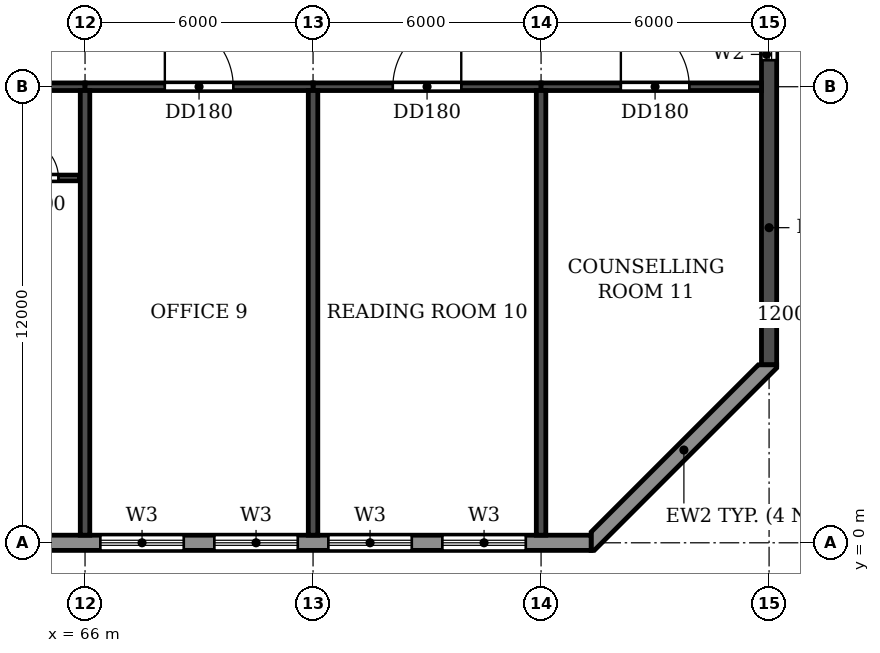
"""IFC4 building model, lengths in metres.
Left out: names, types, materials, properties, quantities, classifications, styles, units other than length and angle.
Written with IfcOpenShell. Run it as: python <this file> out.ifc"""

import sys

from ifc_helpers import new_model, si_unit, direction, frame, frame_2d, origin, place, context, subcontext, project, spatial, polyline, rectangle, outline, extrude, element, fill, save


model = new_model("IFC4")
c1 = context("Model", 3, precision=1e-05, world=origin(), true_north=direction((0.0, 1.0)))
c2 = subcontext(c1, "Body", "Model", "MODEL_VIEW")
j1 = project(units=[si_unit("LENGTHUNIT", "METRE"), si_unit("PLANEANGLEUNIT", "RADIAN")], contexts=[c1])
p1 = place(None, origin())
s1 = spatial("IfcSite", under=j1, at=p1, CompositionType="ELEMENT")
p2 = place(p1, origin())
s2 = spatial("IfcBuilding", under=s1, at=p2, CompositionType="ELEMENT")
p3 = place(p2, frame((0.0, 0.0, 211.5)))
s3 = spatial("IfcBuildingStorey", under=s2, at=p3, CompositionType="ELEMENT", Elevation=211.5)
for number, where, z_axis, x_axis in (
    (1, (66.0, 0.2, 0.0), (0.0, 0.0, 1.0), (0.0, 1.0, 0.0)),
    (2, (72.0, 0.2, 0.0), (0.0, 0.0, 1.0), (0.0, 1.0, 0.0)),
    (3, (78.0, 0.2, 0.0), (0.0, 0.0, 1.0), (0.0, 1.0, 0.0)),
):
    element("IfcWall", number, at=place(p3, frame(where, z_axis=z_axis, x_axis=x_axis)), inside=s3, PredefinedType="SHEAR", context=c2, shape_type="SweptSolid", body=[
        extrude(rectangle(XDim=11.7, YDim=0.25, at=frame_2d((5.85, 0.0))), origin(), (0.0, 0.0, 1.0), 2.95),
    ])
p4 = place(p3, frame((84.0, 4.683, 0.0), z_axis=(0.0, 0.0, 1.0), x_axis=(0.0, 1.0, 0.0)))
e4 = element("IfcWall", 4, at=p4, inside=s3, PredefinedType="SHEAR", context=c2, shape_type="SweptSolid", body=[
    extrude(rectangle(XDim=31.834, YDim=0.4, at=frame_2d((15.917, 0.0))), origin(), (0.0, 0.0, 1.0), 2.95),
])
p5 = place(p4, frame((23.817, 0.0, 0.9)))
e5 = element("IfcOpeningElement", 5, at=p5, cuts=e4, PredefinedType="OPENING", context=c2, shape_type="SweptSolid", body=[
    extrude(rectangle(XDim=1.2, YDim=1.5, at=frame_2d((0.6, 0.75))), frame((0.0, 0.21, 0.0), z_axis=(0.0, -1.0, 0.0), x_axis=(1.0, 0.0, 0.0)), (0.0, 0.0, 1.0), 0.42),
])
p6 = place(p4, frame((8.017, 0.0, 0.9)))
e6 = element("IfcOpeningElement", 6, at=p6, cuts=e4, PredefinedType="OPENING", context=c2, shape_type="SweptSolid", body=[
    extrude(rectangle(XDim=1.2, YDim=1.5, at=frame_2d((0.6, 0.75))), frame((0.0, 0.21, 0.0), z_axis=(0.0, -1.0, 0.0), x_axis=(1.0, 0.0, 0.0)), (0.0, 0.0, 1.0), 0.42),
])
p7 = place(p4, frame((27.694, 0.0, 0.6)))
e7 = element("IfcOpeningElement", 7, at=p7, cuts=e4, PredefinedType="OPENING", context=c2, shape_type="SweptSolid", body=[
    extrude(rectangle(XDim=2.2, YDim=1.8, at=frame_2d((1.1, 0.9))), frame((0.0, 0.21, 0.0), z_axis=(0.0, -1.0, 0.0), x_axis=(1.0, 0.0, 0.0)), (0.0, 0.0, 1.0), 0.42),
])
p8 = place(p4, frame((15.917, 0.0, 0.9)))
e8 = element("IfcOpeningElement", 8, at=p8, cuts=e4, PredefinedType="OPENING", context=c2, shape_type="SweptSolid", body=[
    extrude(rectangle(XDim=1.2, YDim=1.5, at=frame_2d((0.6, 0.75))), frame((0.0, 0.21, 0.0), z_axis=(0.0, -1.0, 0.0), x_axis=(1.0, 0.0, 0.0)), (0.0, 0.0, 1.0), 0.42),
])
p9 = place(p3, frame((60.0, 12.0, 0.0), z_axis=(0.0, 0.0, 1.0), x_axis=(1.0, 0.0, 0.0)))
e9 = element("IfcWall", 9, at=p9, inside=s3, PredefinedType="SHEAR", context=c2, shape_type="SweptSolid", body=[
    extrude(rectangle(XDim=6.0, YDim=0.2, at=frame_2d((3.0, 0.0))), origin(), (0.0, 0.0, 1.0), 2.35),
])
p10 = place(p9, frame((2.55, 0.0, 0.0)))
e10 = element("IfcOpeningElement", 10, at=p10, cuts=e9, PredefinedType="OPENING", context=c2, shape_type="SweptSolid", body=[
    extrude(rectangle(XDim=0.9, YDim=2.1, at=frame_2d((0.45, 1.05))), frame((0.0, 0.11, 0.0), z_axis=(0.0, -1.0, 0.0), x_axis=(1.0, 0.0, 0.0)), (0.0, 0.0, 1.0), 0.22),
])
p11 = place(p3, frame((66.0, 12.0, 0.0), z_axis=(0.0, 0.0, 1.0), x_axis=(1.0, 0.0, 0.0)))
e11 = element("IfcWall", 11, at=p11, inside=s3, PredefinedType="SHEAR", context=c2, shape_type="SweptSolid", body=[
    extrude(rectangle(XDim=6.0, YDim=0.2, at=frame_2d((3.0, 0.0))), origin(), (0.0, 0.0, 1.0), 2.35),
])
p12 = place(p11, frame((2.1, 0.0, 0.0)))
e12 = element("IfcOpeningElement", 12, at=p12, cuts=e11, PredefinedType="OPENING", context=c2, shape_type="SweptSolid", body=[
    extrude(rectangle(XDim=1.8, YDim=2.1, at=frame_2d((0.9, 1.05))), frame((0.0, 0.11, 0.0), z_axis=(0.0, -1.0, 0.0), x_axis=(1.0, 0.0, 0.0)), (0.0, 0.0, 1.0), 0.22),
])
p13 = place(p3, frame((72.0, 12.0, 0.0), z_axis=(0.0, 0.0, 1.0), x_axis=(1.0, 0.0, 0.0)))
e13 = element("IfcWall", 13, at=p13, inside=s3, PredefinedType="SHEAR", context=c2, shape_type="SweptSolid", body=[
    extrude(rectangle(XDim=6.0, YDim=0.2, at=frame_2d((3.0, 0.0))), origin(), (0.0, 0.0, 1.0), 2.35),
])
p14 = place(p13, frame((2.1, 0.0, 0.0)))
e14 = element("IfcOpeningElement", 14, at=p14, cuts=e13, PredefinedType="OPENING", context=c2, shape_type="SweptSolid", body=[
    extrude(rectangle(XDim=1.8, YDim=2.1, at=frame_2d((0.9, 1.05))), frame((0.0, 0.11, 0.0), z_axis=(0.0, -1.0, 0.0), x_axis=(1.0, 0.0, 0.0)), (0.0, 0.0, 1.0), 0.22),
])
p15 = place(p3, frame((78.0, 12.0, 0.0), z_axis=(0.0, 0.0, 1.0), x_axis=(1.0, 0.0, 0.0)))
e15 = element("IfcWall", 15, at=p15, inside=s3, PredefinedType="SHEAR", context=c2, shape_type="SweptSolid", body=[
    extrude(rectangle(XDim=5.8, YDim=0.2, at=frame_2d((2.9, 0.0))), origin(), (0.0, 0.0, 1.0), 2.35),
])
p16 = place(p15, frame((2.1, 0.0, 0.0)))
e16 = element("IfcOpeningElement", 16, at=p16, cuts=e15, PredefinedType="OPENING", context=c2, shape_type="SweptSolid", body=[
    extrude(rectangle(XDim=1.8, YDim=2.1, at=frame_2d((0.9, 1.05))), frame((0.0, 0.11, 0.0), z_axis=(0.0, -1.0, 0.0), x_axis=(1.0, 0.0, 0.0)), (0.0, 0.0, 1.0), 0.22),
])
p17 = place(p3, frame((22.683, 0.0, 0.0), z_axis=(0.0, 0.0, 1.0), x_axis=(1.0, 0.0, 0.0)))
e17 = element("IfcWall", 17, at=p17, inside=s3, PredefinedType="STANDARD", context=c2, shape_type="SweptSolid", body=[
    extrude(rectangle(XDim=56.634, YDim=0.4, at=frame_2d((28.317, 0.0))), origin(), (0.0, 0.0, 1.0), 2.95),
])
p18 = place(p17, frame((1.717, 0.0, 0.6)))
e18 = element("IfcOpeningElement", 18, at=p18, cuts=e17, PredefinedType="OPENING", context=c2, shape_type="SweptSolid", body=[
    extrude(rectangle(XDim=2.2, YDim=1.8, at=frame_2d((1.1, 0.9))), frame((0.0, 0.21, 0.0), z_axis=(0.0, -1.0, 0.0), x_axis=(1.0, 0.0, 0.0)), (0.0, 0.0, 1.0), 0.42),
])
p19 = place(p17, frame((4.717, 0.0, 0.6)))
e19 = element("IfcOpeningElement", 19, at=p19, cuts=e17, PredefinedType="OPENING", context=c2, shape_type="SweptSolid", body=[
    extrude(rectangle(XDim=2.2, YDim=1.8, at=frame_2d((1.1, 0.9))), frame((0.0, 0.21, 0.0), z_axis=(0.0, -1.0, 0.0), x_axis=(1.0, 0.0, 0.0)), (0.0, 0.0, 1.0), 0.42),
])
p20 = place(p17, frame((7.717, 0.0, 0.6)))
e20 = element("IfcOpeningElement", 20, at=p20, cuts=e17, PredefinedType="OPENING", context=c2, shape_type="SweptSolid", body=[
    extrude(rectangle(XDim=2.2, YDim=1.8, at=frame_2d((1.1, 0.9))), frame((0.0, 0.21, 0.0), z_axis=(0.0, -1.0, 0.0), x_axis=(1.0, 0.0, 0.0)), (0.0, 0.0, 1.0), 0.42),
])
p21 = place(p17, frame((10.717, 0.0, 0.6)))
e21 = element("IfcOpeningElement", 21, at=p21, cuts=e17, PredefinedType="OPENING", context=c2, shape_type="SweptSolid", body=[
    extrude(rectangle(XDim=2.2, YDim=1.8, at=frame_2d((1.1, 0.9))), frame((0.0, 0.21, 0.0), z_axis=(0.0, -1.0, 0.0), x_axis=(1.0, 0.0, 0.0)), (0.0, 0.0, 1.0), 0.42),
])
p22 = place(p17, frame((13.717, 0.0, 0.6)))
e22 = element("IfcOpeningElement", 22, at=p22, cuts=e17, PredefinedType="OPENING", context=c2, shape_type="SweptSolid", body=[
    extrude(rectangle(XDim=2.2, YDim=1.8, at=frame_2d((1.1, 0.9))), frame((0.0, 0.21, 0.0), z_axis=(0.0, -1.0, 0.0), x_axis=(1.0, 0.0, 0.0)), (0.0, 0.0, 1.0), 0.42),
])
p23 = place(p17, frame((16.717, 0.0, 0.6)))
e23 = element("IfcOpeningElement", 23, at=p23, cuts=e17, PredefinedType="OPENING", context=c2, shape_type="SweptSolid", body=[
    extrude(rectangle(XDim=2.2, YDim=1.8, at=frame_2d((1.1, 0.9))), frame((0.0, 0.21, 0.0), z_axis=(0.0, -1.0, 0.0), x_axis=(1.0, 0.0, 0.0)), (0.0, 0.0, 1.0), 0.42),
])
p24 = place(p17, frame((19.717, 0.0, 0.6)))
e24 = element("IfcOpeningElement", 24, at=p24, cuts=e17, PredefinedType="OPENING", context=c2, shape_type="SweptSolid", body=[
    extrude(rectangle(XDim=2.2, YDim=1.8, at=frame_2d((1.1, 0.9))), frame((0.0, 0.21, 0.0), z_axis=(0.0, -1.0, 0.0), x_axis=(1.0, 0.0, 0.0)), (0.0, 0.0, 1.0), 0.42),
])
p25 = place(p17, frame((22.717, 0.0, 0.6)))
e25 = element("IfcOpeningElement", 25, at=p25, cuts=e17, PredefinedType="OPENING", context=c2, shape_type="SweptSolid", body=[
    extrude(rectangle(XDim=2.2, YDim=1.8, at=frame_2d((1.1, 0.9))), frame((0.0, 0.21, 0.0), z_axis=(0.0, -1.0, 0.0), x_axis=(1.0, 0.0, 0.0)), (0.0, 0.0, 1.0), 0.42),
])
p26 = place(p17, frame((25.717, 0.0, 0.6)))
e26 = element("IfcOpeningElement", 26, at=p26, cuts=e17, PredefinedType="OPENING", context=c2, shape_type="SweptSolid", body=[
    extrude(rectangle(XDim=2.2, YDim=1.8, at=frame_2d((1.1, 0.9))), frame((0.0, 0.21, 0.0), z_axis=(0.0, -1.0, 0.0), x_axis=(1.0, 0.0, 0.0)), (0.0, 0.0, 1.0), 0.42),
])
p27 = place(p17, frame((28.717, 0.0, 0.6)))
e27 = element("IfcOpeningElement", 27, at=p27, cuts=e17, PredefinedType="OPENING", context=c2, shape_type="SweptSolid", body=[
    extrude(rectangle(XDim=2.2, YDim=1.8, at=frame_2d((1.1, 0.9))), frame((0.0, 0.21, 0.0), z_axis=(0.0, -1.0, 0.0), x_axis=(1.0, 0.0, 0.0)), (0.0, 0.0, 1.0), 0.42),
])
p28 = place(p17, frame((31.717, 0.0, 0.6)))
e28 = element("IfcOpeningElement", 28, at=p28, cuts=e17, PredefinedType="OPENING", context=c2, shape_type="SweptSolid", body=[
    extrude(rectangle(XDim=2.2, YDim=1.8, at=frame_2d((1.1, 0.9))), frame((0.0, 0.21, 0.0), z_axis=(0.0, -1.0, 0.0), x_axis=(1.0, 0.0, 0.0)), (0.0, 0.0, 1.0), 0.42),
])
p29 = place(p17, frame((34.717, 0.0, 0.6)))
e29 = element("IfcOpeningElement", 29, at=p29, cuts=e17, PredefinedType="OPENING", context=c2, shape_type="SweptSolid", body=[
    extrude(rectangle(XDim=2.2, YDim=1.8, at=frame_2d((1.1, 0.9))), frame((0.0, 0.21, 0.0), z_axis=(0.0, -1.0, 0.0), x_axis=(1.0, 0.0, 0.0)), (0.0, 0.0, 1.0), 0.42),
])
p30 = place(p17, frame((43.717, 0.0, 0.6)))
e30 = element("IfcOpeningElement", 30, at=p30, cuts=e17, PredefinedType="OPENING", context=c2, shape_type="SweptSolid", body=[
    extrude(rectangle(XDim=2.2, YDim=1.8, at=frame_2d((1.1, 0.9))), frame((0.0, 0.21, 0.0), z_axis=(0.0, -1.0, 0.0), x_axis=(1.0, 0.0, 0.0)), (0.0, 0.0, 1.0), 0.42),
])
p31 = place(p17, frame((46.717, 0.0, 0.6)))
e31 = element("IfcOpeningElement", 31, at=p31, cuts=e17, PredefinedType="OPENING", context=c2, shape_type="SweptSolid", body=[
    extrude(rectangle(XDim=2.2, YDim=1.8, at=frame_2d((1.1, 0.9))), frame((0.0, 0.21, 0.0), z_axis=(0.0, -1.0, 0.0), x_axis=(1.0, 0.0, 0.0)), (0.0, 0.0, 1.0), 0.42),
])
p32 = place(p17, frame((49.717, 0.0, 0.6)))
e32 = element("IfcOpeningElement", 32, at=p32, cuts=e17, PredefinedType="OPENING", context=c2, shape_type="SweptSolid", body=[
    extrude(rectangle(XDim=2.2, YDim=1.8, at=frame_2d((1.1, 0.9))), frame((0.0, 0.21, 0.0), z_axis=(0.0, -1.0, 0.0), x_axis=(1.0, 0.0, 0.0)), (0.0, 0.0, 1.0), 0.42),
])
p33 = place(p17, frame((52.717, 0.0, 0.6)))
e33 = element("IfcOpeningElement", 33, at=p33, cuts=e17, PredefinedType="OPENING", context=c2, shape_type="SweptSolid", body=[
    extrude(rectangle(XDim=2.2, YDim=1.8, at=frame_2d((1.1, 0.9))), frame((0.0, 0.21, 0.0), z_axis=(0.0, -1.0, 0.0), x_axis=(1.0, 0.0, 0.0)), (0.0, 0.0, 1.0), 0.42),
])
p34 = place(p3, origin())
e34 = element("IfcWall", 34, at=p34, inside=s3, PredefinedType="STANDARD", context=c2, shape_type="SweptSolid", body=[
    extrude(outline(polyline([(79.317, -0.2), (79.4, -0.2), (84.2, 4.6), (84.2, 4.683), (83.717, 4.683), (79.317, 0.283), (79.317, -0.2)])), origin(), (0.0, 0.0, 1.0), 2.95),
])
p35 = place(p3, frame((60.135, 9.6, 0.0), z_axis=(0.0, 0.0, 1.0), x_axis=(1.0, 0.0, 0.0)))
e35 = element("IfcWall", 35, at=p35, inside=s3, PredefinedType="PARTITIONING", context=c2, shape_type="SweptSolid", body=[
    extrude(rectangle(XDim=5.73, YDim=0.15, at=frame_2d((2.865, 0.0))), origin(), (0.0, 0.0, 1.0), 2.95),
])
p36 = place(p35, frame((1.165, 0.0, 0.0)))
e36 = element("IfcOpeningElement", 36, at=p36, cuts=e35, PredefinedType="OPENING", context=c2, shape_type="SweptSolid", body=[
    extrude(rectangle(XDim=1.0, YDim=2.1, at=frame_2d((0.5, 1.05))), frame((0.0, 0.085, 0.0), z_axis=(0.0, -1.0, 0.0), x_axis=(1.0, 0.0, 0.0)), (0.0, 0.0, 1.0), 0.17),
])
p37 = place(p35, frame((4.165, 0.0, 0.0)))
e37 = element("IfcOpeningElement", 37, at=p37, cuts=e35, PredefinedType="OPENING", context=c2, shape_type="SweptSolid", body=[
    extrude(rectangle(XDim=1.0, YDim=2.1, at=frame_2d((0.5, 1.05))), frame((0.0, 0.085, 0.0), z_axis=(0.0, -1.0, 0.0), x_axis=(1.0, 0.0, 0.0)), (0.0, 0.0, 1.0), 0.17),
])
p38 = place(p30, origin())
e38 = element("IfcWindow", 38, at=p38, inside=s3, PartitioningType="DOUBLE_PANEL_HORIZONTAL", PredefinedType="WINDOW", context=c2, shape_type="SweptSolid", body=[
    extrude(rectangle(XDim=2.2, YDim=1.8, at=frame_2d((1.1, 0.9))), frame((0.0, 0.03, 0.0), z_axis=(0.0, -1.0, 0.0), x_axis=(1.0, 0.0, 0.0)), (0.0, 0.0, 1.0), 0.06),
])
fill(e30, e38)
p39 = place(p31, origin())
e39 = element("IfcWindow", 39, at=p39, inside=s3, PartitioningType="DOUBLE_PANEL_HORIZONTAL", PredefinedType="WINDOW", context=c2, shape_type="SweptSolid", body=[
    extrude(rectangle(XDim=2.2, YDim=1.8, at=frame_2d((1.1, 0.9))), frame((0.0, 0.03, 0.0), z_axis=(0.0, -1.0, 0.0), x_axis=(1.0, 0.0, 0.0)), (0.0, 0.0, 1.0), 0.06),
])
fill(e31, e39)
p40 = place(p32, origin())
e40 = element("IfcWindow", 40, at=p40, inside=s3, PartitioningType="DOUBLE_PANEL_HORIZONTAL", PredefinedType="WINDOW", context=c2, shape_type="SweptSolid", body=[
    extrude(rectangle(XDim=2.2, YDim=1.8, at=frame_2d((1.1, 0.9))), frame((0.0, 0.03, 0.0), z_axis=(0.0, -1.0, 0.0), x_axis=(1.0, 0.0, 0.0)), (0.0, 0.0, 1.0), 0.06),
])
fill(e32, e40)
p41 = place(p33, origin())
e41 = element("IfcWindow", 41, at=p41, inside=s3, PartitioningType="DOUBLE_PANEL_HORIZONTAL", PredefinedType="WINDOW", context=c2, shape_type="SweptSolid", body=[
    extrude(rectangle(XDim=2.2, YDim=1.8, at=frame_2d((1.1, 0.9))), frame((0.0, 0.03, 0.0), z_axis=(0.0, -1.0, 0.0), x_axis=(1.0, 0.0, 0.0)), (0.0, 0.0, 1.0), 0.06),
])
fill(e33, e41)
p42 = place(p6, origin())
e42 = element("IfcWindow", 42, at=p42, inside=s3, PartitioningType="SINGLE_PANEL", PredefinedType="WINDOW", context=c2, shape_type="SweptSolid", body=[
    extrude(rectangle(XDim=1.2, YDim=1.5, at=frame_2d((0.6, 0.75))), frame((0.0, 0.03, 0.0), z_axis=(0.0, -1.0, 0.0), x_axis=(1.0, 0.0, 0.0)), (0.0, 0.0, 1.0), 0.06),
])
fill(e6, e42)
p43 = place(p12, origin())
e43 = element("IfcDoor", 43, at=p43, inside=s3, OperationType="DOUBLE_DOOR_SINGLE_SWING", PredefinedType="DOOR", context=c2, shape_type="SweptSolid", body=[
    extrude(rectangle(XDim=1.8, YDim=2.1, at=frame_2d((0.9, 1.05))), frame((0.0, 0.025, 0.0), z_axis=(0.0, -1.0, 0.0), x_axis=(1.0, 0.0, 0.0)), (0.0, 0.0, 1.0), 0.05),
])
fill(e12, e43)
p44 = place(p14, origin())
e44 = element("IfcDoor", 44, at=p44, inside=s3, OperationType="DOUBLE_DOOR_SINGLE_SWING", PredefinedType="DOOR", context=c2, shape_type="SweptSolid", body=[
    extrude(rectangle(XDim=1.8, YDim=2.1, at=frame_2d((0.9, 1.05))), frame((0.0, 0.025, 0.0), z_axis=(0.0, -1.0, 0.0), x_axis=(1.0, 0.0, 0.0)), (0.0, 0.0, 1.0), 0.05),
])
fill(e14, e44)
p45 = place(p16, origin())
e45 = element("IfcDoor", 45, at=p45, inside=s3, OperationType="DOUBLE_DOOR_SINGLE_SWING", PredefinedType="DOOR", context=c2, shape_type="SweptSolid", body=[
    extrude(rectangle(XDim=1.8, YDim=2.1, at=frame_2d((0.9, 1.05))), frame((0.0, 0.025, 0.0), z_axis=(0.0, -1.0, 0.0), x_axis=(1.0, 0.0, 0.0)), (0.0, 0.0, 1.0), 0.05),
])
fill(e16, e45)
p46 = place(p37, origin())
e46 = element("IfcDoor", 46, at=p46, inside=s3, OperationType="SINGLE_SWING_LEFT", PredefinedType="DOOR", context=c2, shape_type="SweptSolid", body=[
    extrude(rectangle(XDim=1.0, YDim=2.1, at=frame_2d((0.5, 1.05))), frame((0.0, 0.025, 0.0), z_axis=(0.0, -1.0, 0.0), x_axis=(1.0, 0.0, 0.0)), (0.0, 0.0, 1.0), 0.05),
])
fill(e37, e46)
save(model, sys.argv[1])
